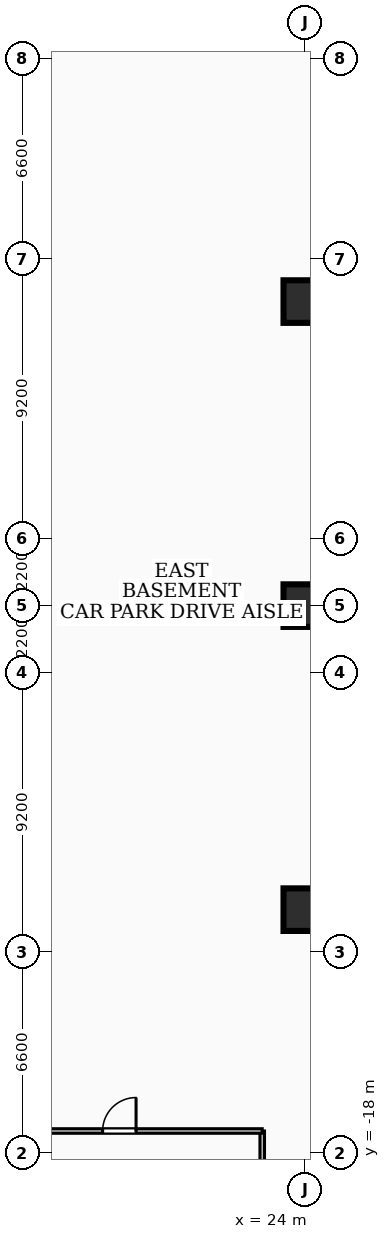
"""IFC4 building model, lengths in metres.
Left out: names, types, materials, properties, quantities, classifications, styles, units other than length and angle.
Written with IfcOpenShell. Run it as: python <this file> out.ifc"""

import sys

from ifc_helpers import new_model, si_unit, direction, frame, frame_2d, origin, origin_2d, place, context, subcontext, project, spatial, rectangle, extrude, element, fill, save


model = new_model("IFC4")
c1 = context("Model", 3, precision=1e-05, world=origin(), true_north=direction((0.0, 1.0)))
c2 = subcontext(c1, "Body", "Model", "MODEL_VIEW")
j1 = project(units=[si_unit("LENGTHUNIT", "METRE"), si_unit("PLANEANGLEUNIT", "RADIAN")], contexts=[c1])
p1 = place(None, origin())
s1 = spatial("IfcSite", under=j1, at=p1, CompositionType="ELEMENT")
p2 = place(p1, origin())
s2 = spatial("IfcBuilding", under=s1, at=p2, CompositionType="ELEMENT")
p3 = place(p2, frame((0.0, 0.0, -4.5)))
s3 = spatial("IfcBuildingStorey", under=s2, at=p3, CompositionType="ELEMENT", Elevation=-4.5)
for number, where, z_axis, x_axis in (
    (1, (24.0, -10.0, 0.0), (0.0, 0.0, 1.0), (1.0, 0.0, 0.0)),
    (2, (24.0, 0.0, 0.0), (0.0, 0.0, 1.0), (1.0, 0.0, 0.0)),
    (3, (24.0, 10.0, 0.0), (0.0, 0.0, 1.0), (1.0, 0.0, 0.0)),
):
    element("IfcColumn", number, at=place(p3, frame(where, z_axis=z_axis, x_axis=x_axis)), inside=s3, PredefinedType="COLUMN", context=c2, shape_type="SweptSolid", body=[
        extrude(rectangle(XDim=1.4, YDim=1.4, at=origin_2d()), origin(), (0.0, 0.0, 1.0), 4.5),
    ])
p4 = place(p3, frame((13.2, -17.28, 0.0), z_axis=(0.0, 0.0, 1.0), x_axis=(1.0, 0.0, 0.0)))
e4 = element("IfcWall", 4, at=p4, inside=s3, PredefinedType="PARTITIONING", context=c2, shape_type="SweptSolid", body=[
    extrude(rectangle(XDim=9.4, YDim=0.15, at=frame_2d((4.7, 0.0))), origin(), (0.0, 0.0, 1.0), 4.18),
])
p5 = place(p4, frame((4.15, 0.0, 0.0)))
e5 = element("IfcOpeningElement", 5, at=p5, cuts=e4, PredefinedType="OPENING", context=c2, shape_type="SweptSolid", body=[
    extrude(rectangle(XDim=1.1, YDim=2.15, at=frame_2d((0.55, 1.075))), frame((0.0, 0.085, 0.0), z_axis=(0.0, -1.0, 0.0), x_axis=(1.0, 0.0, 0.0)), (0.0, 0.0, 1.0), 0.17),
])
p6 = place(p3, frame((22.6, -25.8, 0.0), z_axis=(0.0, 0.0, 1.0), x_axis=(0.0, 1.0, 0.0)))
e6 = element("IfcWall", 6, at=p6, inside=s3, PredefinedType="PARTITIONING", context=c2, shape_type="SweptSolid", body=[
    extrude(rectangle(XDim=8.52, YDim=0.15, at=frame_2d((4.26, 0.0))), origin(), (0.0, 0.0, 1.0), 4.18),
])
p7 = place(p5, origin())
e7 = element("IfcDoor", 7, at=p7, inside=s3, OperationType="SINGLE_SWING_RIGHT", PredefinedType="DOOR", context=c2, shape_type="SweptSolid", body=[
    extrude(rectangle(XDim=1.1, YDim=2.15, at=frame_2d((0.55, 1.075))), frame((0.0, 0.025, 0.0), z_axis=(0.0, -1.0, 0.0), x_axis=(1.0, 0.0, 0.0)), (0.0, 0.0, 1.0), 0.05),
])
fill(e5, e7)
save(model, sys.argv[1])
